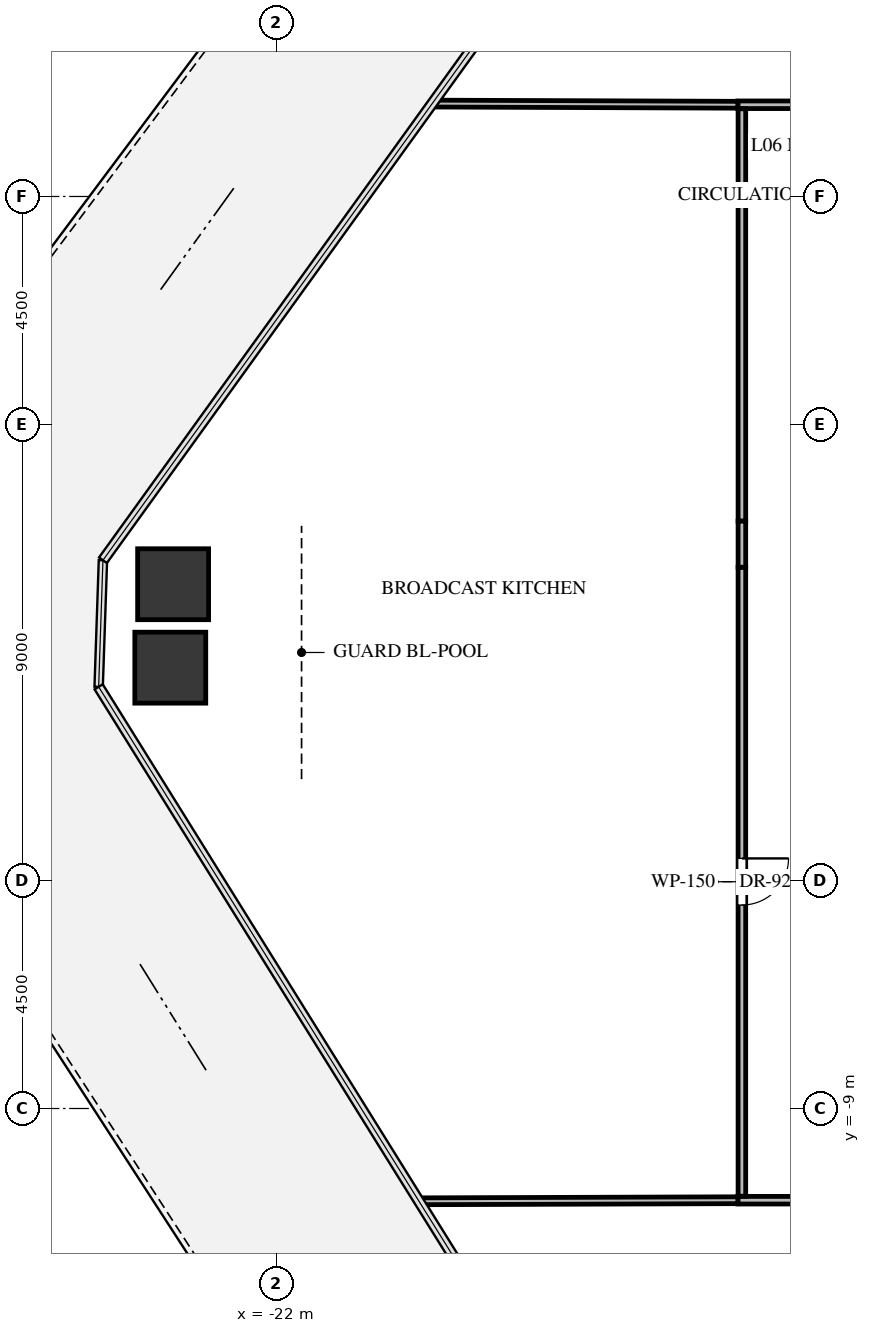
"""IFC4 building model, lengths in metres.
Left out: names, types, materials, properties, quantities, classifications, styles, units other than length and angle.
Written with IfcOpenShell. Run it as: python <this file> out.ifc"""

import sys

from ifc_helpers import new_model, si_unit, direction, frame, frame_2d, origin, origin_2d, place, context, subcontext, project, spatial, rectangle, extrude, source, transform, mapped, element, fill, save


model = new_model("IFC4")
c1 = context("Model", 3, precision=1e-05, world=origin(), true_north=direction((0.0, 1.0)))
c2 = subcontext(c1, "Body", "Model", "MODEL_VIEW")
j1 = project(units=[si_unit("LENGTHUNIT", "METRE"), si_unit("PLANEANGLEUNIT", "RADIAN")], contexts=[c1])
p1 = place(None, origin())
s1 = spatial("IfcSite", under=j1, at=p1, CompositionType="ELEMENT")
p2 = place(p1, origin())
s2 = spatial("IfcBuilding", under=s1, at=p2, CompositionType="ELEMENT")
p3 = place(p2, frame((0.0, 0.0, 32.4)))
s3 = spatial("IfcBuildingStorey", under=s2, at=p3, CompositionType="ELEMENT", Elevation=32.4)
m1 = source(origin(), c2, "Body", "SweptSolid", [
    extrude(rectangle(XDim=1.4, YDim=1.4, at=origin_2d()), origin(), (0.0, 0.0, 1.0), 3.3),
])
for number, where, z_axis, x_axis in (
    (1, (-24.091, -0.3, -0.24), (0.0, 0.0, 1.0), (1.0, 0.0, 0.0)),
    (2, (-24.035, 1.347, -0.24), (0.0, 0.0, 1.0), (1.0, 0.0, 0.0)),
):
    element("IfcColumn", number, at=place(p3, frame(where, z_axis=z_axis, x_axis=x_axis)), inside=s3, PredefinedType="COLUMN", context=c2, shape_type="MappedRepresentation", body=[
        mapped(m1, transform((0.0, 0.0, 0.0), x_axis=(1.0, 0.0, 0.0), y_axis=(0.0, 1.0, 0.0), z_axis=(0.0, 0.0, 1.0), scale=1.0)),
    ])
p4 = place(p3, frame((-10.72, 10.81, 0.0), z_axis=(0.0, 0.0, 1.0), x_axis=(-1.0, 0.0, 0.0)))
e3 = element("IfcWall", 3, at=p4, inside=s3, PredefinedType="PARTITIONING", context=c2, shape_type="SweptSolid", body=[
    extrude(rectangle(XDim=2.17, YDim=0.15, at=frame_2d((1.085, 0.0))), origin(), (0.0, 0.0, 1.0), 3.045),
])
p5 = place(p3, frame((-12.89, -10.81, 0.0), z_axis=(0.0, 0.0, 1.0), x_axis=(1.0, 0.0, 0.0)))
e4 = element("IfcWall", 4, at=p5, inside=s3, PredefinedType="PARTITIONING", context=c2, shape_type="SweptSolid", body=[
    extrude(rectangle(XDim=6.768, YDim=0.15, at=frame_2d((3.384, 0.0))), origin(), (0.0, 0.0, 1.0), 2.13),
])
p6 = place(p5, frame((2.934, 0.0, 0.0)))
e5 = element("IfcOpeningElement", 5, at=p6, cuts=e4, PredefinedType="OPENING", context=c2, shape_type="SweptSolid", body=[
    extrude(rectangle(XDim=0.9, YDim=2.05, at=frame_2d((0.45, 1.025))), frame((0.0, 0.085, 0.0), z_axis=(0.0, -1.0, 0.0), x_axis=(1.0, 0.0, 0.0)), (0.0, 0.0, 1.0), 0.17),
])
p7 = place(p3, frame((-12.81, 10.731, 0.0), z_axis=(0.0, 0.0, 1.0), x_axis=(0.0, -1.0, 0.0)))
e6 = element("IfcWall", 6, at=p7, inside=s3, PredefinedType="PARTITIONING", context=c2, shape_type="SweptSolid", body=[
    extrude(rectangle(XDim=8.139, YDim=0.15, at=frame_2d((4.069, 0.0))), origin(), (0.0, 0.0, 1.0), 3.045),
])
p8 = place(p3, frame((-12.81, 1.682, 0.0), z_axis=(0.0, 0.0, 1.0), x_axis=(0.0, -1.0, 0.0)))
e7 = element("IfcWall", 7, at=p8, inside=s3, PredefinedType="PARTITIONING", context=c2, shape_type="SweptSolid", body=[
    extrude(rectangle(XDim=12.413, YDim=0.15, at=frame_2d((6.207, 0.0))), origin(), (0.0, 0.0, 1.0), 3.045),
])
p9 = place(p8, frame((5.747, 0.0, 0.0)))
e8 = element("IfcOpeningElement", 8, at=p9, cuts=e7, PredefinedType="OPENING", context=c2, shape_type="SweptSolid", body=[
    extrude(rectangle(XDim=0.92, YDim=2.1, at=frame_2d((0.46, 1.05))), frame((0.0, 0.085, 0.0), z_axis=(0.0, -1.0, 0.0), x_axis=(1.0, 0.0, 0.0)), (0.0, 0.0, 1.0), 0.17),
])
p10 = place(p3, frame((-12.81, 2.592, 0.0), z_axis=(0.0, 0.0, 1.0), x_axis=(0.0, -1.0, 0.0)))
e9 = element("IfcWall", 9, at=p10, inside=s3, PredefinedType="PARTITIONING", context=c2, shape_type="SweptSolid", body=[
    extrude(rectangle(XDim=0.91, YDim=0.15, at=frame_2d((0.455, 0.0))), origin(), (0.0, 0.0, 1.0), 2.13),
])
p11 = place(p3, frame((-12.89, 10.81, 0.0), z_axis=(0.0, 0.0, 1.0), x_axis=(-0.999992607823, 0.003845035728, 0.0)))
e10 = element("IfcWall", 10, at=p11, inside=s3, PredefinedType="PARTITIONING", context=c2, shape_type="SweptSolid", body=[
    extrude(rectangle(XDim=6.032, YDim=0.135, at=frame_2d((3.016, 0.0))), origin(), (0.0, 0.0, 1.0), 2.38),
])
p12 = place(p3, frame((-19.182, -10.831, 0.0), z_axis=(0.0, 0.0, 1.0), x_axis=(0.999994432845, 0.003336806783, 0.0)))
e11 = element("IfcWall", 11, at=p12, inside=s3, PredefinedType="PARTITIONING", context=c2, shape_type="SweptSolid", body=[
    extrude(rectangle(XDim=6.292, YDim=0.135, at=frame_2d((3.146, 0.0))), origin(), (0.0, 0.0, 1.0), 2.38),
])
m2 = source(origin(), c2, "Body", "SweptSolid", [
    extrude(rectangle(XDim=0.92, YDim=2.1, at=frame_2d((0.46, 1.05))), frame((0.0, 0.025, 0.0), z_axis=(0.0, -1.0, 0.0), x_axis=(1.0, 0.0, 0.0)), (0.0, 0.0, 1.0), 0.05),
])
p13 = place(p9, origin())
e12 = element("IfcDoor", 12, at=p13, inside=s3, OperationType="SINGLE_SWING_LEFT", PredefinedType="DOOR", context=c2, shape_type="MappedRepresentation", body=[
    mapped(m2, transform((0.0, 0.0, 0.0), x_axis=(1.0, 0.0, 0.0), y_axis=(0.0, 1.0, 0.0), z_axis=(0.0, 0.0, 1.0), scale=1.0)),
])
fill(e8, e12)
save(model, sys.argv[1])
